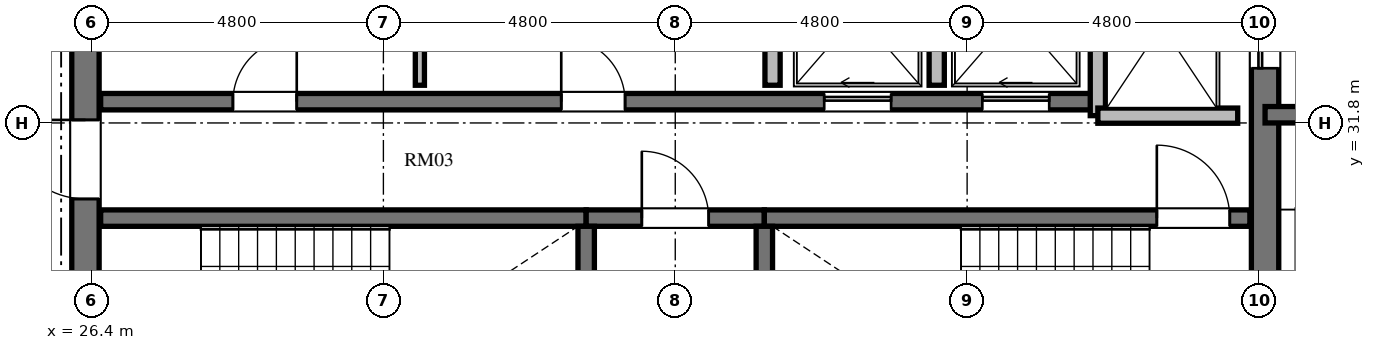
"""IFC4 building model, lengths in metres.
Left out: names, types, materials, properties, quantities, classifications, styles, units other than length and angle.
Written with IfcOpenShell. Run it as: python <this file> out.ifc"""

import sys

from ifc_helpers import new_model, si_unit, direction, frame, frame_2d, origin, place, context, subcontext, project, spatial, rectangle, extrude, element, fill, save


model = new_model("IFC4")
c1 = context("Model", 3, precision=1e-05, world=origin(), true_north=direction((0.0, 1.0)))
c2 = subcontext(c1, "Body", "Model", "MODEL_VIEW")
j1 = project(units=[si_unit("LENGTHUNIT", "METRE"), si_unit("PLANEANGLEUNIT", "RADIAN")], contexts=[c1])
p1 = place(None, origin())
s1 = spatial("IfcSite", under=j1, at=p1, CompositionType="ELEMENT")
p2 = place(p1, origin())
s2 = spatial("IfcBuilding", under=s1, at=p2, CompositionType="ELEMENT")
p3 = place(p2, frame((0.0, 0.0, 255.024)))
s3 = spatial("IfcBuildingStorey", under=s2, at=p3, CompositionType="ELEMENT", Elevation=255.024)
p4 = place(p3, frame((26.3, 20.95, 0.0), z_axis=(0.0, 0.0, 1.0), x_axis=(0.0, 1.0, 0.0)))
e1 = element("IfcWall", 1, at=p4, inside=s3, PredefinedType="SHEAR", context=c2, shape_type="SweptSolid", body=[
    extrude(rectangle(XDim=14.1, YDim=0.45, at=frame_2d((7.05, 0.0))), origin(), (0.0, 0.0, 1.0), 3.648),
])
p5 = place(p4, frame((6.5, 0.0, 0.0)))
e2 = element("IfcOpeningElement", 2, at=p5, cuts=e1, PredefinedType="OPENING", context=c2, shape_type="SweptSolid", body=[
    extrude(rectangle(XDim=1.2, YDim=2.15, at=frame_2d((0.6, 1.075))), frame((0.0, 0.235, 0.0), z_axis=(0.0, -1.0, 0.0), x_axis=(1.0, 0.0, 0.0)), (0.0, 0.0, 1.0), 0.47),
])
p6 = place(p4, frame((9.6, 0.0, 0.0)))
e3 = element("IfcOpeningElement", 3, at=p6, cuts=e1, PredefinedType="OPENING", context=c2, shape_type="SweptSolid", body=[
    extrude(rectangle(XDim=1.3, YDim=2.2, at=frame_2d((0.65, 1.1))), frame((0.0, 0.235, 0.0), z_axis=(0.0, -1.0, 0.0), x_axis=(1.0, 0.0, 0.0)), (0.0, 0.0, 1.0), 0.47),
])
p7 = place(p4, frame((3.26, 0.0, 0.0)))
e4 = element("IfcOpeningElement", 4, at=p7, cuts=e1, PredefinedType="OPENING", context=c2, shape_type="SweptSolid", body=[
    extrude(rectangle(XDim=1.3, YDim=2.2, at=frame_2d((0.65, 1.1))), frame((0.0, 0.235, 0.0), z_axis=(0.0, -1.0, 0.0), x_axis=(1.0, 0.0, 0.0)), (0.0, 0.0, 1.0), 0.47),
])
p8 = place(p3, frame((45.7, 20.95, 0.0), z_axis=(0.0, 0.0, 1.0), x_axis=(0.0, 1.0, 0.0)))
e5 = element("IfcWall", 5, at=p8, inside=s3, PredefinedType="SHEAR", context=c2, shape_type="SweptSolid", body=[
    extrude(rectangle(XDim=14.1, YDim=0.45, at=frame_2d((7.05, 0.0))), origin(), (0.0, 0.0, 1.0), 3.648),
])
p9 = place(p8, frame((11.75, 0.0, 0.0)))
e6 = element("IfcOpeningElement", 6, at=p9, cuts=e5, PredefinedType="OPENING", context=c2, shape_type="SweptSolid", body=[
    extrude(rectangle(XDim=1.4, YDim=2.3, at=frame_2d((0.7, 1.15))), frame((0.0, 0.235, 0.0), z_axis=(0.0, -1.0, 0.0), x_axis=(1.0, 0.0, 0.0)), (0.0, 0.0, 1.0), 0.47),
])
p10 = place(p8, frame((0.95, 0.0, 0.0)))
e7 = element("IfcOpeningElement", 7, at=p10, cuts=e5, PredefinedType="OPENING", context=c2, shape_type="SweptSolid", body=[
    extrude(rectangle(XDim=1.4, YDim=2.3, at=frame_2d((0.7, 1.15))), frame((0.0, 0.235, 0.0), z_axis=(0.0, -1.0, 0.0), x_axis=(1.0, 0.0, 0.0)), (0.0, 0.0, 1.0), 0.47),
])
p11 = place(p3, frame((26.55, 30.235, 0.0), z_axis=(0.0, 0.0, 1.0), x_axis=(1.0, 0.0, 0.0)))
e8 = element("IfcWall", 8, at=p11, inside=s3, PredefinedType="SHEAR", context=c2, shape_type="SweptSolid", body=[
    extrude(rectangle(XDim=7.985, YDim=0.27, at=frame_2d((3.992, 0.0))), origin(), (0.0, 0.0, 1.0), 3.648),
])
p12 = place(p3, frame((34.535, 30.235, 0.0), z_axis=(0.0, 0.0, 1.0), x_axis=(1.0, 0.0, 0.0)))
e9 = element("IfcWall", 9, at=p12, inside=s3, PredefinedType="SHEAR", context=c2, shape_type="SweptSolid", body=[
    extrude(rectangle(XDim=2.93, YDim=0.27, at=frame_2d((1.465, 0.0))), origin(), (0.0, 0.0, 1.0), 3.648),
])
p13 = place(p12, frame((0.915, 0.0, 0.0)))
e10 = element("IfcOpeningElement", 10, at=p13, cuts=e9, PredefinedType="OPENING", context=c2, shape_type="SweptSolid", body=[
    extrude(rectangle(XDim=1.1, YDim=2.15, at=frame_2d((0.55, 1.075))), frame((0.0, 0.145, 0.0), z_axis=(0.0, -1.0, 0.0), x_axis=(1.0, 0.0, 0.0)), (0.0, 0.0, 1.0), 0.29),
])
p14 = place(p3, frame((37.465, 30.235, 0.0), z_axis=(0.0, 0.0, 1.0), x_axis=(1.0, 0.0, 0.0)))
e11 = element("IfcWall", 11, at=p14, inside=s3, PredefinedType="SHEAR", context=c2, shape_type="SweptSolid", body=[
    extrude(rectangle(XDim=7.985, YDim=0.27, at=frame_2d((3.992, 0.0))), origin(), (0.0, 0.0, 1.0), 3.648),
])
p15 = place(p14, frame((6.455, 0.0, 0.0)))
e12 = element("IfcOpeningElement", 12, at=p15, cuts=e11, PredefinedType="OPENING", context=c2, shape_type="SweptSolid", body=[
    extrude(rectangle(XDim=1.2, YDim=2.15, at=frame_2d((0.6, 1.075))), frame((0.0, 0.145, 0.0), z_axis=(0.0, -1.0, 0.0), x_axis=(1.0, 0.0, 0.0)), (0.0, 0.0, 1.0), 0.29),
])
for number, where, z_axis, x_axis in (
    (13, (34.535, 26.02, 0.0), (0.0, 0.0, 1.0), (0.0, 1.0, 0.0)),
    (14, (37.465, 26.02, 0.0), (0.0, 0.0, 1.0), (0.0, 1.0, 0.0)),
):
    element("IfcWall", number, at=place(p3, frame(where, z_axis=z_axis, x_axis=x_axis)), inside=s3, PredefinedType="SHEAR", context=c2, shape_type="SweptSolid", body=[
        extrude(rectangle(XDim=4.08, YDim=0.27, at=frame_2d((2.04, 0.0))), origin(), (0.0, 0.0, 1.0), 3.648),
    ])
p16 = place(p3, frame((26.55, 32.15, 0.0), z_axis=(0.0, 0.0, 1.0), x_axis=(1.0, 0.0, 0.0)))
e15 = element("IfcWall", 15, at=p16, inside=s3, PredefinedType="SHEAR", context=c2, shape_type="SweptSolid", body=[
    extrude(rectangle(XDim=16.4, YDim=0.27, at=frame_2d((8.2, 0.0))), origin(), (0.0, 0.0, 1.0), 3.648),
])
p17 = place(p16, frame((2.175, 0.0, 0.0)))
e16 = element("IfcOpeningElement", 16, at=p17, cuts=e15, PredefinedType="OPENING", context=c2, shape_type="SweptSolid", body=[
    extrude(rectangle(XDim=1.05, YDim=2.15, at=frame_2d((0.525, 1.075))), frame((0.0, 0.145, 0.0), z_axis=(0.0, -1.0, 0.0), x_axis=(1.0, 0.0, 0.0)), (0.0, 0.0, 1.0), 0.29),
])
p18 = place(p16, frame((7.575, 0.0, 0.0)))
e17 = element("IfcOpeningElement", 17, at=p18, cuts=e15, PredefinedType="OPENING", context=c2, shape_type="SweptSolid", body=[
    extrude(rectangle(XDim=1.05, YDim=2.15, at=frame_2d((0.525, 1.075))), frame((0.0, 0.145, 0.0), z_axis=(0.0, -1.0, 0.0), x_axis=(1.0, 0.0, 0.0)), (0.0, 0.0, 1.0), 0.29),
])
p19 = place(p16, frame((11.9, 0.0, 0.0)))
e18 = element("IfcOpeningElement", 18, at=p19, cuts=e15, PredefinedType="OPENING", context=c2, shape_type="SweptSolid", body=[
    extrude(rectangle(XDim=1.1, YDim=2.2, at=frame_2d((0.55, 1.1))), frame((0.0, 0.145, 0.0), z_axis=(0.0, -1.0, 0.0), x_axis=(1.0, 0.0, 0.0)), (0.0, 0.0, 1.0), 0.29),
])
p20 = place(p16, frame((14.5, 0.0, 0.0)))
e19 = element("IfcOpeningElement", 19, at=p20, cuts=e15, PredefinedType="OPENING", context=c2, shape_type="SweptSolid", body=[
    extrude(rectangle(XDim=1.1, YDim=2.2, at=frame_2d((0.55, 1.1))), frame((0.0, 0.145, 0.0), z_axis=(0.0, -1.0, 0.0), x_axis=(1.0, 0.0, 0.0)), (0.0, 0.0, 1.0), 0.29),
])
p21 = place(p3, frame((42.95, 31.92, 0.0), z_axis=(0.0, 0.0, 1.0), x_axis=(0.0, 1.0, 0.0)))
e20 = element("IfcWall", 20, at=p21, inside=s3, PredefinedType="SOLIDWALL", context=c2, shape_type="SweptSolid", body=[
    extrude(rectangle(XDim=3.18, YDim=0.25, at=frame_2d((1.59, 0.0))), origin(), (0.0, 0.0, 1.0), 3.448),
])
p22 = place(p3, frame((42.95, 31.92, 0.0), z_axis=(0.0, 0.0, 1.0), x_axis=(1.0, 0.0, 0.0)))
e21 = element("IfcWall", 21, at=p22, inside=s3, PredefinedType="SOLIDWALL", context=c2, shape_type="SweptSolid", body=[
    extrude(rectangle(XDim=2.3, YDim=0.25, at=frame_2d((1.15, 0.0))), origin(), (0.0, 0.0, 1.0), 3.448),
])
for number, where, z_axis, x_axis in (
    (22, (37.6, 32.42, 0.0), (0.0, 0.0, 1.0), (0.0, 1.0, 0.0)),
    (23, (40.3, 32.42, 0.0), (0.0, 0.0, 1.0), (0.0, 1.0, 0.0)),
):
    element("IfcWall", number, at=place(p3, frame(where, z_axis=z_axis, x_axis=x_axis)), inside=s3, PredefinedType="SOLIDWALL", context=c2, shape_type="SweptSolid", body=[
        extrude(rectangle(XDim=2.68, YDim=0.25, at=frame_2d((1.34, 0.0))), origin(), (0.0, 0.0, 1.0), 3.448),
    ])
p23 = place(p3, frame((31.8, 32.42, 0.0), z_axis=(0.0, 0.0, 1.0), x_axis=(0.0, 1.0, 0.0)))
e24 = element("IfcWall", 24, at=p23, inside=s3, PredefinedType="PARTITIONING", context=c2, shape_type="SweptSolid", body=[
    extrude(rectangle(XDim=2.68, YDim=0.15, at=frame_2d((1.34, 0.0))), origin(), (0.0, 0.0, 1.0), 3.448),
])
p24 = place(p3, frame((45.7, 31.935, 0.0), z_axis=(0.0, 0.0, 1.0), x_axis=(1.0, 0.0, 0.0)))
e25 = element("IfcWall", 25, at=p24, inside=s3, PredefinedType="SHEAR", context=c2, shape_type="SweptSolid", body=[
    extrude(rectangle(XDim=4.715, YDim=0.27, at=frame_2d((2.357, 0.0))), origin(), (0.0, 0.0, 1.0), 3.648),
])
p25 = place(p15, origin())
e26 = element("IfcDoor", 26, at=p25, inside=s3, OperationType="SINGLE_SWING_LEFT", PredefinedType="DOOR", context=c2, shape_type="SweptSolid", body=[
    extrude(rectangle(XDim=1.2, YDim=2.15, at=frame_2d((0.6, 1.075))), frame((0.0, 0.025, 0.0), z_axis=(0.0, -1.0, 0.0), x_axis=(1.0, 0.0, 0.0)), (0.0, 0.0, 1.0), 0.05),
])
fill(e12, e26)
p26 = place(p13, origin())
e27 = element("IfcDoor", 27, at=p26, inside=s3, OperationType="SINGLE_SWING_LEFT", PredefinedType="DOOR", context=c2, shape_type="SweptSolid", body=[
    extrude(rectangle(XDim=1.1, YDim=2.15, at=frame_2d((0.55, 1.075))), frame((0.0, 0.025, 0.0), z_axis=(0.0, -1.0, 0.0), x_axis=(1.0, 0.0, 0.0)), (0.0, 0.0, 1.0), 0.05),
])
fill(e10, e27)
p27 = place(p6, origin())
e28 = element("IfcDoor", 28, at=p27, inside=s3, OperationType="SINGLE_SWING_RIGHT", PredefinedType="DOOR", context=c2, shape_type="SweptSolid", body=[
    extrude(rectangle(XDim=1.3, YDim=2.2, at=frame_2d((0.65, 1.1))), frame((0.0, 0.025, 0.0), z_axis=(0.0, -1.0, 0.0), x_axis=(1.0, 0.0, 0.0)), (0.0, 0.0, 1.0), 0.05),
])
fill(e3, e28)
p28 = place(p17, origin())
e29 = element("IfcDoor", 29, at=p28, inside=s3, OperationType="SINGLE_SWING_RIGHT", PredefinedType="DOOR", context=c2, shape_type="SweptSolid", body=[
    extrude(rectangle(XDim=1.05, YDim=2.15, at=frame_2d((0.525, 1.075))), frame((0.0, 0.025, 0.0), z_axis=(0.0, -1.0, 0.0), x_axis=(1.0, 0.0, 0.0)), (0.0, 0.0, 1.0), 0.05),
])
fill(e16, e29)
p29 = place(p18, origin())
e30 = element("IfcDoor", 30, at=p29, inside=s3, OperationType="SINGLE_SWING_LEFT", PredefinedType="DOOR", context=c2, shape_type="SweptSolid", body=[
    extrude(rectangle(XDim=1.05, YDim=2.15, at=frame_2d((0.525, 1.075))), frame((0.0, 0.025, 0.0), z_axis=(0.0, -1.0, 0.0), x_axis=(1.0, 0.0, 0.0)), (0.0, 0.0, 1.0), 0.05),
])
fill(e17, e30)
p30 = place(p19, origin())
e31 = element("IfcDoor", 31, at=p30, inside=s3, OperationType="SLIDING_TO_LEFT", PredefinedType="DOOR", context=c2, shape_type="SweptSolid", body=[
    extrude(rectangle(XDim=1.1, YDim=2.2, at=frame_2d((0.55, 1.1))), frame((0.0, 0.025, 0.0), z_axis=(0.0, -1.0, 0.0), x_axis=(1.0, 0.0, 0.0)), (0.0, 0.0, 1.0), 0.05),
])
fill(e18, e31)
p31 = place(p20, origin())
e32 = element("IfcDoor", 32, at=p31, inside=s3, OperationType="SLIDING_TO_LEFT", PredefinedType="DOOR", context=c2, shape_type="SweptSolid", body=[
    extrude(rectangle(XDim=1.1, YDim=2.2, at=frame_2d((0.55, 1.1))), frame((0.0, 0.025, 0.0), z_axis=(0.0, -1.0, 0.0), x_axis=(1.0, 0.0, 0.0)), (0.0, 0.0, 1.0), 0.05),
])
fill(e19, e32)
p32 = place(p9, origin())
e33 = element("IfcDoor", 33, at=p32, inside=s3, OperationType="SLIDING_TO_LEFT", PredefinedType="DOOR", context=c2, shape_type="SweptSolid", body=[
    extrude(rectangle(XDim=1.4, YDim=2.3, at=frame_2d((0.7, 1.15))), frame((0.0, 0.025, 0.0), z_axis=(0.0, -1.0, 0.0), x_axis=(1.0, 0.0, 0.0)), (0.0, 0.0, 1.0), 0.05),
])
fill(e6, e33)
save(model, sys.argv[1])
